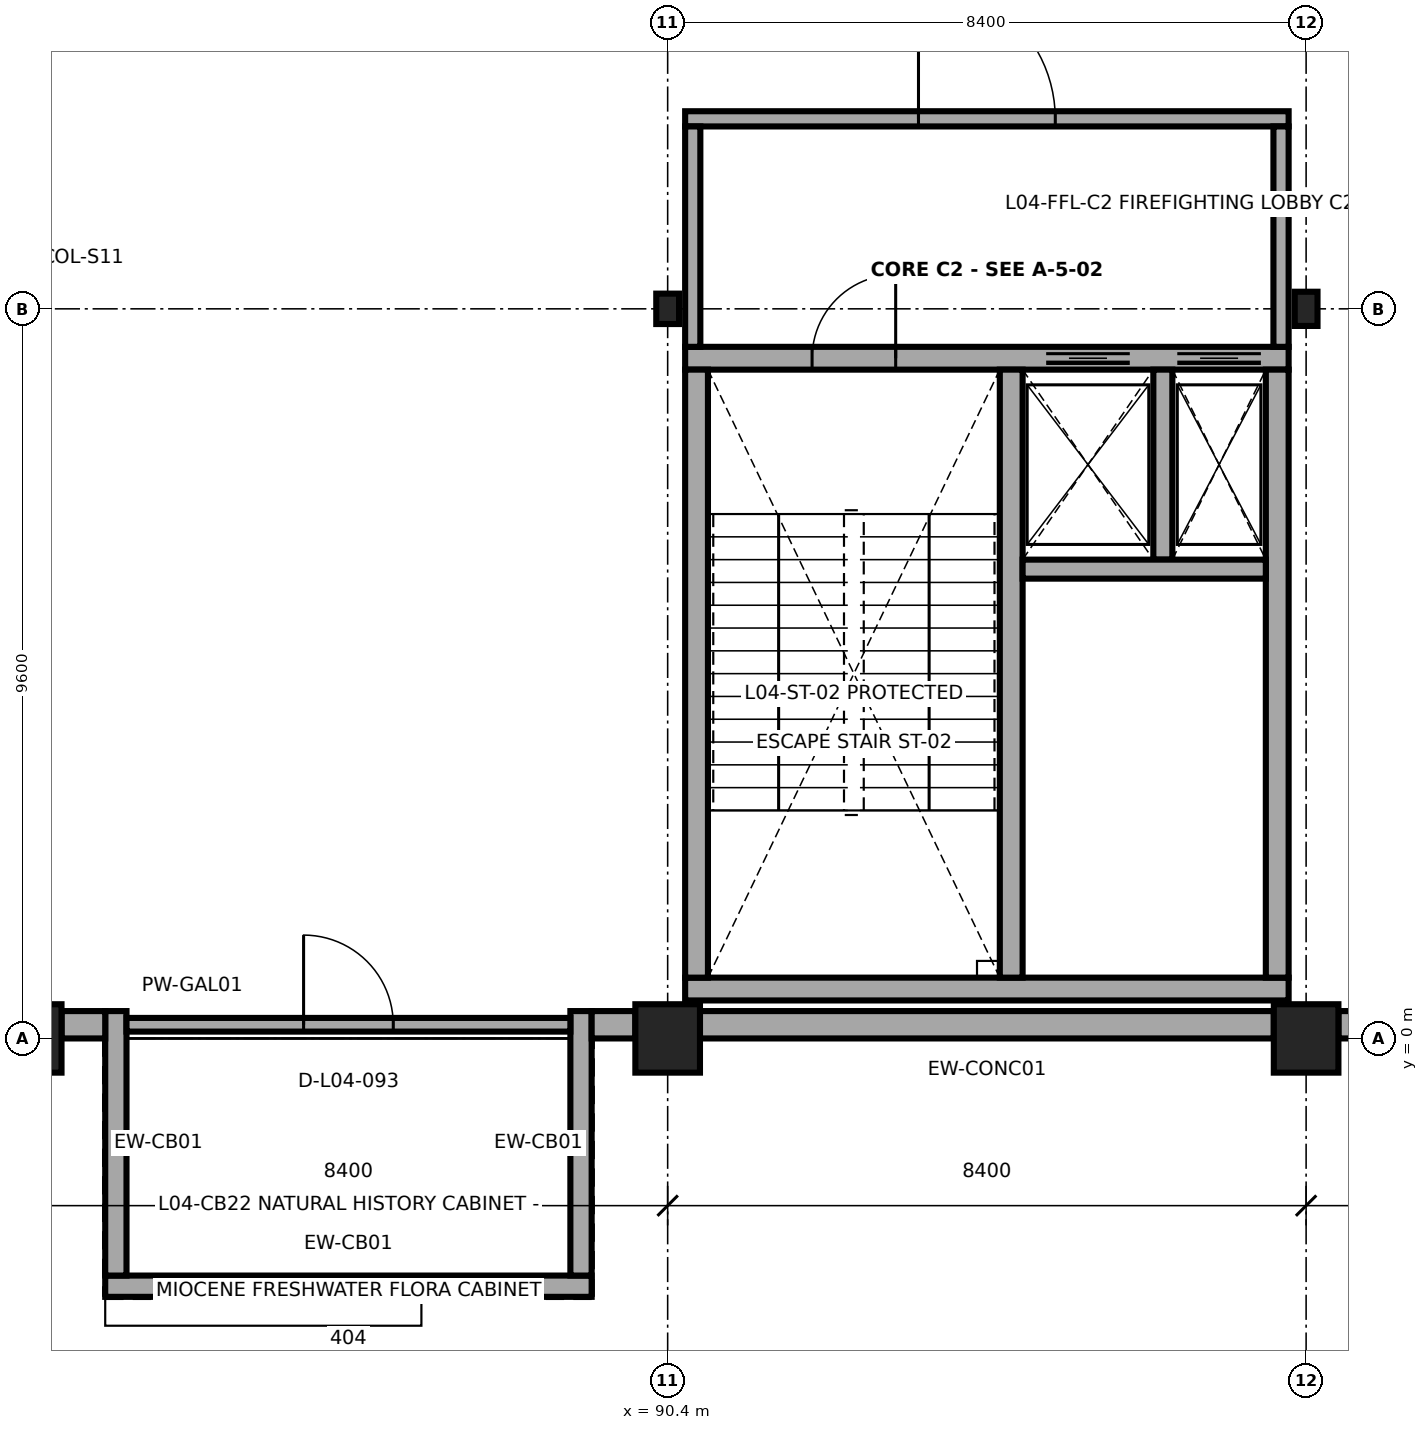
"""IFC4 building model, lengths in metres.
Left out: names, types, materials, properties, quantities, classifications, styles, units other than length and angle.
Written with IfcOpenShell. Run it as: python <this file> out.ifc"""

import sys

from ifc_helpers import new_model, si_unit, direction, frame, frame_2d, origin, origin_2d, place, context, subcontext, project, spatial, rectangle, i_section, extrude, element, fill, save


model = new_model("IFC4")
c1 = context("Model", 3, precision=1e-05, world=origin(), true_north=direction((0.0, 1.0)))
c2 = subcontext(c1, "Body", "Model", "MODEL_VIEW")
j1 = project(units=[si_unit("LENGTHUNIT", "METRE"), si_unit("PLANEANGLEUNIT", "RADIAN")], contexts=[c1])
p1 = place(None, origin())
s1 = spatial("IfcSite", under=j1, at=p1, CompositionType="ELEMENT")
p2 = place(p1, origin())
s2 = spatial("IfcBuilding", under=s1, at=p2, CompositionType="ELEMENT")
p3 = place(p2, frame((0.0, 0.0, 21.9)))
s3 = spatial("IfcBuildingStorey", under=s2, at=p3, CompositionType="ELEMENT", Elevation=21.9)
for number, where, z_axis, x_axis in (
    (1, (82.0, 0.0, 0.0), (0.0, 0.0, 1.0), (1.0, 0.0, 0.0)),
    (2, (90.4, 0.0, 0.0), (0.0, 0.0, 1.0), (1.0, 0.0, 0.0)),
):
    element("IfcColumn", number, at=place(p3, frame(where, z_axis=z_axis, x_axis=x_axis)), inside=s3, PredefinedType="COLUMN", context=c2, shape_type="SweptSolid", body=[
        extrude(rectangle(XDim=0.85, YDim=0.9, at=origin_2d()), origin(), (0.0, 0.0, 1.0), 4.5),
    ])
p4 = place(p3, frame((90.4, 9.6, 0.0), z_axis=(0.0, 0.0, 1.0), x_axis=(1.0, 0.0, 0.0)))
e3 = element("IfcColumn", 3, at=p4, inside=s3, PredefinedType="COLUMN", context=c2, shape_type="SweptSolid", body=[
    extrude(i_section(OverallWidth=0.3, OverallDepth=0.4, WebThickness=0.013, FlangeThickness=0.024, FilletRadius=0.027, at=origin_2d()), origin(), (0.0, 0.0, 1.0), 4.5),
])
p5 = place(p3, frame((98.8, 0.0, 0.0), z_axis=(0.0, 0.0, 1.0), x_axis=(1.0, 0.0, 0.0)))
e4 = element("IfcColumn", 4, at=p5, inside=s3, PredefinedType="COLUMN", context=c2, shape_type="SweptSolid", body=[
    extrude(rectangle(XDim=0.85, YDim=0.9, at=origin_2d()), origin(), (0.0, 0.0, 1.0), 4.5),
])
p6 = place(p3, frame((98.8, 9.6, 0.0), z_axis=(0.0, 0.0, 1.0), x_axis=(1.0, 0.0, 0.0)))
e5 = element("IfcColumn", 5, at=p6, inside=s3, PredefinedType="COLUMN", context=c2, shape_type="SweptSolid", body=[
    extrude(i_section(OverallWidth=0.3, OverallDepth=0.45, WebThickness=0.014, FlangeThickness=0.026, FilletRadius=0.027, at=origin_2d()), origin(), (0.0, 0.0, 1.0), 4.5),
])
p7 = place(p3, frame((83.0, -3.26, 0.0), z_axis=(0.0, 0.0, 1.0), x_axis=(1.0, 0.0, 0.0)))
e6 = element("IfcWall", 6, at=p7, inside=s3, PredefinedType="SOLIDWALL", context=c2, shape_type="SweptSolid", body=[
    extrude(rectangle(XDim=6.4, YDim=0.28, at=frame_2d((3.2, 0.0))), origin(), (0.0, 0.0, 1.0), 2.99),
])
for number, where, z_axis, x_axis in (
    (7, (83.14, 0.36, 0.0), (0.0, 0.0, 1.0), (0.0, -1.0, 0.0)),
    (8, (89.26, -3.12, 0.0), (0.0, 0.0, 1.0), (0.0, 1.0, 0.0)),
):
    element("IfcWall", number, at=place(p3, frame(where, z_axis=z_axis, x_axis=x_axis)), inside=s3, PredefinedType="SOLIDWALL", context=c2, shape_type="SweptSolid", body=[
        extrude(rectangle(XDim=3.48, YDim=0.28, at=frame_2d((1.74, 0.0))), origin(), (0.0, 0.0, 1.0), 2.99),
    ])
p8 = place(p3, frame((82.425, 0.18, 0.0), z_axis=(0.0, 0.0, 1.0), x_axis=(1.0, 0.0, 0.0)))
e9 = element("IfcWall", 9, at=p8, inside=s3, PredefinedType="SOLIDWALL", context=c2, shape_type="SweptSolid", body=[
    extrude(rectangle(XDim=0.575, YDim=0.36, at=frame_2d((0.288, 0.0))), origin(), (0.0, 0.0, 1.0), 3.335),
])
p9 = place(p3, frame((89.4, 0.18, 0.0), z_axis=(0.0, 0.0, 1.0), x_axis=(1.0, 0.0, 0.0)))
e10 = element("IfcWall", 10, at=p9, inside=s3, PredefinedType="SOLIDWALL", context=c2, shape_type="SweptSolid", body=[
    extrude(rectangle(XDim=0.575, YDim=0.36, at=frame_2d((0.288, 0.0))), origin(), (0.0, 0.0, 1.0), 3.335),
])
p10 = place(p3, frame((90.825, 0.18, 0.0), z_axis=(0.0, 0.0, 1.0), x_axis=(1.0, 0.0, 0.0)))
e11 = element("IfcWall", 11, at=p10, inside=s3, PredefinedType="SOLIDWALL", context=c2, shape_type="SweptSolid", body=[
    extrude(rectangle(XDim=7.55, YDim=0.36, at=frame_2d((3.775, 0.0))), origin(), (0.0, 0.0, 1.0), 3.335),
])
p11 = place(p3, frame((99.225, 0.18, 0.0), z_axis=(0.0, 0.0, 1.0), x_axis=(1.0, 0.0, 0.0)))
e12 = element("IfcWall", 12, at=p11, inside=s3, PredefinedType="SOLIDWALL", context=c2, shape_type="SweptSolid", body=[
    extrude(rectangle(XDim=0.575, YDim=0.36, at=frame_2d((0.288, 0.0))), origin(), (0.0, 0.0, 1.0), 3.335),
])
p12 = place(p3, frame((90.63, 0.65, 0.0), z_axis=(0.0, 0.0, 1.0), x_axis=(1.0, 0.0, 0.0)))
e13 = element("IfcWall", 13, at=p12, inside=s3, PredefinedType="SHEAR", context=c2, shape_type="SweptSolid", body=[
    extrude(rectangle(XDim=7.94, YDim=0.3, at=frame_2d((3.97, 0.0))), origin(), (0.0, 0.0, 1.0), 4.25),
])
p13 = place(p3, frame((98.57, 8.95, 0.0), z_axis=(0.0, 0.0, 1.0), x_axis=(-1.0, 0.0, 0.0)))
e14 = element("IfcWall", 14, at=p13, inside=s3, PredefinedType="SHEAR", context=c2, shape_type="SweptSolid", body=[
    extrude(rectangle(XDim=7.94, YDim=0.3, at=frame_2d((3.97, 0.0))), origin(), (0.0, 0.0, 1.0), 4.25),
])
p14 = place(p13, frame((5.17, 0.0, 0.0)))
e15 = element("IfcOpeningElement", 15, at=p14, cuts=e14, PredefinedType="OPENING", context=c2, shape_type="SweptSolid", body=[
    extrude(rectangle(XDim=1.1, YDim=2.2, at=frame_2d((0.55, 1.1))), frame((0.0, 0.16, 0.0), z_axis=(0.0, -1.0, 0.0), x_axis=(1.0, 0.0, 0.0)), (0.0, 0.0, 1.0), 0.32),
])
p15 = place(p13, frame((2.09, 0.0, 0.0)))
e16 = element("IfcOpeningElement", 16, at=p15, cuts=e14, PredefinedType="OPENING", context=c2, shape_type="SweptSolid", body=[
    extrude(rectangle(XDim=1.1, YDim=2.1, at=frame_2d((0.55, 1.05))), frame((0.0, 0.16, 0.0), z_axis=(0.0, -1.0, 0.0), x_axis=(1.0, 0.0, 0.0)), (0.0, 0.0, 1.0), 0.32),
])
p16 = place(p13, frame((0.365, 0.0, 0.0)))
e17 = element("IfcOpeningElement", 17, at=p16, cuts=e14, PredefinedType="OPENING", context=c2, shape_type="SweptSolid", body=[
    extrude(rectangle(XDim=1.1, YDim=2.1, at=frame_2d((0.55, 1.05))), frame((0.0, 0.16, 0.0), z_axis=(0.0, -1.0, 0.0), x_axis=(1.0, 0.0, 0.0)), (0.0, 0.0, 1.0), 0.32),
])
for number, where, z_axis, x_axis in (
    (18, (90.78, 8.8, 0.0), (0.0, 0.0, 1.0), (0.0, -1.0, 0.0)),
    (19, (98.42, 0.8, 0.0), (0.0, 0.0, 1.0), (0.0, 1.0, 0.0)),
    (20, (94.92, 0.8, 0.0), (0.0, 0.0, 1.0), (0.0, 1.0, 0.0)),
):
    element("IfcWall", number, at=place(p3, frame(where, z_axis=z_axis, x_axis=x_axis)), inside=s3, PredefinedType="SHEAR", context=c2, shape_type="SweptSolid", body=[
        extrude(rectangle(XDim=8.0, YDim=0.3, at=frame_2d((4.0, 0.0))), origin(), (0.0, 0.0, 1.0), 4.25),
    ])
p17 = place(p3, frame((96.915, 6.3, 0.0), z_axis=(0.0, 0.0, 1.0), x_axis=(0.0, 1.0, 0.0)))
e21 = element("IfcWall", 21, at=p17, inside=s3, PredefinedType="SHEAR", context=c2, shape_type="SweptSolid", body=[
    extrude(rectangle(XDim=2.5, YDim=0.25, at=frame_2d((1.25, 0.0))), origin(), (0.0, 0.0, 1.0), 4.25),
])
p18 = place(p3, frame((95.07, 6.175, 0.0), z_axis=(0.0, 0.0, 1.0), x_axis=(1.0, 0.0, 0.0)))
e22 = element("IfcWall", 22, at=p18, inside=s3, PredefinedType="SHEAR", context=c2, shape_type="SweptSolid", body=[
    extrude(rectangle(XDim=3.2, YDim=0.25, at=frame_2d((1.6, 0.0))), origin(), (0.0, 0.0, 1.0), 4.25),
])
p19 = place(p3, frame((90.63, 12.1, 0.0), z_axis=(0.0, 0.0, 1.0), x_axis=(1.0, 0.0, 0.0)))
e23 = element("IfcWall", 23, at=p19, inside=s3, PredefinedType="SOLIDWALL", context=c2, shape_type="SweptSolid", body=[
    extrude(rectangle(XDim=7.94, YDim=0.2, at=frame_2d((3.97, 0.0))), origin(), (0.0, 0.0, 1.0), 3.902),
])
p20 = place(p19, frame((3.07, 0.0, 0.0)))
e24 = element("IfcOpeningElement", 24, at=p20, cuts=e23, PredefinedType="OPENING", context=c2, shape_type="SweptSolid", body=[
    extrude(rectangle(XDim=1.8, YDim=2.2, at=frame_2d((0.9, 1.1))), frame((0.0, 0.11, 0.0), z_axis=(0.0, -1.0, 0.0), x_axis=(1.0, 0.0, 0.0)), (0.0, 0.0, 1.0), 0.22),
])
for number, where, z_axis, x_axis in (
    (25, (90.73, 9.1, 0.0), (0.0, 0.0, 1.0), (0.0, 1.0, 0.0)),
    (26, (98.47, 12.0, 0.0), (0.0, 0.0, 1.0), (0.0, -1.0, 0.0)),
):
    element("IfcWall", number, at=place(p3, frame(where, z_axis=z_axis, x_axis=x_axis)), inside=s3, PredefinedType="SOLIDWALL", context=c2, shape_type="SweptSolid", body=[
        extrude(rectangle(XDim=2.9, YDim=0.2, at=frame_2d((1.45, 0.0))), origin(), (0.0, 0.0, 1.0), 3.732),
    ])
p21 = place(p3, frame((83.28, 0.18, 0.0), z_axis=(0.0, 0.0, 1.0), x_axis=(1.0, 0.0, 0.0)))
e27 = element("IfcWall", 27, at=p21, inside=s3, PredefinedType="PARTITIONING", context=c2, shape_type="SweptSolid", body=[
    extrude(rectangle(XDim=5.84, YDim=0.18, at=frame_2d((2.92, 0.0))), origin(), (0.0, 0.0, 1.0), 2.99),
])
p22 = place(p21, frame((2.33, 0.0, 0.0)))
e28 = element("IfcOpeningElement", 28, at=p22, cuts=e27, PredefinedType="OPENING", context=c2, shape_type="SweptSolid", body=[
    extrude(rectangle(XDim=1.18, YDim=2.25, at=frame_2d((0.59, 1.125))), frame((0.0, 0.1, 0.0), z_axis=(0.0, -1.0, 0.0), x_axis=(1.0, 0.0, 0.0)), (0.0, 0.0, 1.0), 0.2),
])
p23 = place(p14, origin())
e29 = element("IfcDoor", 29, at=p23, inside=s3, OperationType="SINGLE_SWING_RIGHT", PredefinedType="DOOR", context=c2, shape_type="SweptSolid", body=[
    extrude(rectangle(XDim=1.1, YDim=2.2, at=frame_2d((0.55, 1.1))), frame((0.0, 0.025, 0.0), z_axis=(0.0, -1.0, 0.0), x_axis=(1.0, 0.0, 0.0)), (0.0, 0.0, 1.0), 0.05),
])
fill(e15, e29)
p24 = place(p15, origin())
e30 = element("IfcDoor", 30, at=p24, inside=s3, OperationType="SLIDING_TO_LEFT", PredefinedType="DOOR", context=c2, shape_type="SweptSolid", body=[
    extrude(rectangle(XDim=1.1, YDim=2.1, at=frame_2d((0.55, 1.05))), frame((0.0, 0.025, 0.0), z_axis=(0.0, -1.0, 0.0), x_axis=(1.0, 0.0, 0.0)), (0.0, 0.0, 1.0), 0.05),
])
fill(e16, e30)
p25 = place(p16, origin())
e31 = element("IfcDoor", 31, at=p25, inside=s3, OperationType="SLIDING_TO_LEFT", PredefinedType="DOOR", context=c2, shape_type="SweptSolid", body=[
    extrude(rectangle(XDim=1.1, YDim=2.1, at=frame_2d((0.55, 1.05))), frame((0.0, 0.025, 0.0), z_axis=(0.0, -1.0, 0.0), x_axis=(1.0, 0.0, 0.0)), (0.0, 0.0, 1.0), 0.05),
])
fill(e17, e31)
p26 = place(p20, origin())
e32 = element("IfcDoor", 32, at=p26, inside=s3, OperationType="DOUBLE_DOOR_SINGLE_SWING", PredefinedType="DOOR", context=c2, shape_type="SweptSolid", body=[
    extrude(rectangle(XDim=1.8, YDim=2.2, at=frame_2d((0.9, 1.1))), frame((0.0, 0.025, 0.0), z_axis=(0.0, -1.0, 0.0), x_axis=(1.0, 0.0, 0.0)), (0.0, 0.0, 1.0), 0.05),
])
fill(e24, e32)
p27 = place(p22, origin())
e33 = element("IfcDoor", 33, at=p27, inside=s3, OperationType="SINGLE_SWING_LEFT", PredefinedType="DOOR", context=c2, shape_type="SweptSolid", body=[
    extrude(rectangle(XDim=1.18, YDim=2.25, at=frame_2d((0.59, 1.125))), frame((0.0, 0.025, 0.0), z_axis=(0.0, -1.0, 0.0), x_axis=(1.0, 0.0, 0.0)), (0.0, 0.0, 1.0), 0.05),
])
fill(e28, e33)
save(model, sys.argv[1])
